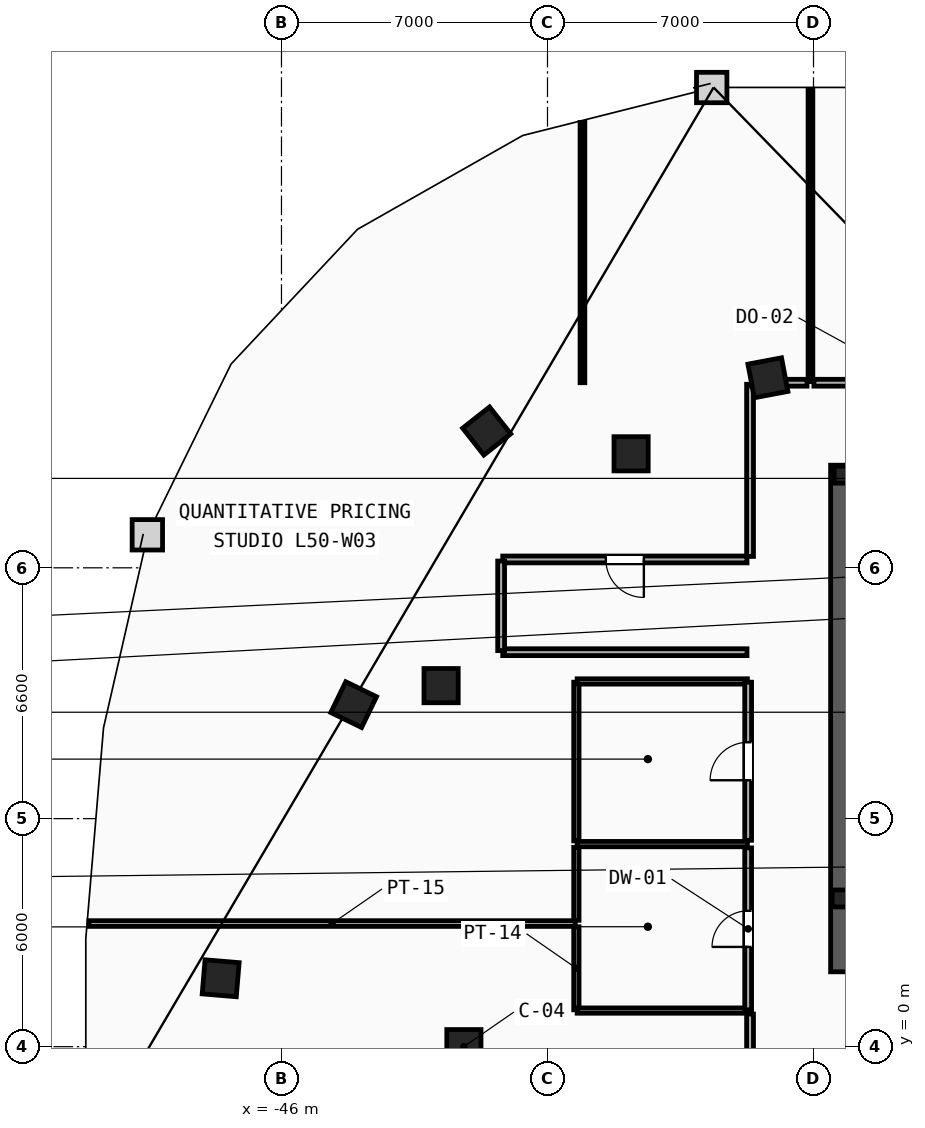
"""IFC4 building model, lengths in metres.
Left out: names, types, materials, properties, quantities, classifications, styles, units other than length and angle.
Written with IfcOpenShell. Run it as: python <this file> out.ifc"""

import sys

from ifc_helpers import new_model, si_unit, direction, frame, frame_2d, origin, origin_2d, place, context, subcontext, project, spatial, rectangle, i_section, extrude, element, fill, save


model = new_model("IFC4")
c1 = context("Model", 3, precision=1e-05, world=origin(), true_north=direction((0.0, 1.0)))
c2 = subcontext(c1, "Body", "Model", "MODEL_VIEW")
j1 = project(units=[si_unit("LENGTHUNIT", "METRE"), si_unit("PLANEANGLEUNIT", "RADIAN")], contexts=[c1])
p1 = place(None, origin())
s1 = spatial("IfcSite", under=j1, at=p1, CompositionType="ELEMENT")
p2 = place(p1, origin())
s2 = spatial("IfcBuilding", under=s1, at=p2, CompositionType="ELEMENT")
p3 = place(p2, frame((0.0, 0.0, 191.8)))
s3 = spatial("IfcBuildingStorey", under=s2, at=p3, CompositionType="ELEMENT", Elevation=191.8)
for number, where, z_axis, x_axis in (
    (1, (-31.3, 3.9, 0.0), (0.0, 0.0, 1.0), (1.0, 0.0, 0.0)),
    (2, (-31.25, 15.05, 0.0), (0.0, 0.0, 1.0), (1.0, 0.0, 0.0)),
):
    element("IfcColumn", number, at=place(p3, frame(where, z_axis=z_axis, x_axis=x_axis)), inside=s3, PredefinedType="COLUMN", context=c2, shape_type="SweptSolid", body=[
        extrude(i_section(OverallWidth=0.416, OverallDepth=0.446, WebThickness=0.039, FlangeThickness=0.063, FilletRadius=0.018, at=origin_2d()), origin(), (0.0, 0.0, 1.0), 3.6),
    ])
for number, where, z_axis, x_axis in (
    (3, (-41.2, 0.0, 0.0), (0.0, 0.0, 1.0), (1.0, 0.0, 0.0)),
    (4, (-41.8, 9.5, 0.0), (0.0, 0.0, 1.0), (1.0, 0.0, 0.0)),
    (5, (-36.8, 15.6, 0.0), (0.0, 0.0, 1.0), (1.0, 0.0, 0.0)),
    (6, (-33.2, 17.6, 0.0), (0.0, 0.0, 1.0), (-0.983, -0.186, 0.0)),
    (7, (-40.6, 16.2, 0.0), (0.0, 0.0, 1.0), (-0.785, -0.619, 0.0)),
    (8, (-44.1, 9.0, 0.0), (0.0, 0.0, 1.0), (-0.437, -0.899, 0.0)),
    (9, (-47.6, 1.8, 0.0), (0.0, 0.0, 1.0), (-0.084, -0.997, 0.0)),
):
    element("IfcColumn", number, at=place(p3, frame(where, z_axis=z_axis, x_axis=x_axis)), inside=s3, PredefinedType="COLUMN", context=c2, shape_type="SweptSolid", body=[
        extrude(rectangle(XDim=0.9, YDim=0.9, at=origin_2d()), origin(), (0.0, 0.0, 1.0), 3.6),
    ])
p4 = place(p3, frame((-31.225, 1.97, 0.0), z_axis=(0.0, 0.0, 1.0), x_axis=(0.0, 1.0, 0.0)))
e10 = element("IfcWall", 10, at=p4, inside=s3, PredefinedType="SHEAR", context=c2, shape_type="SweptSolid", body=[
    extrude(rectangle(XDim=13.33, YDim=0.65, at=frame_2d((6.665, 0.0))), origin(), (0.0, 0.0, 1.0), 3.34),
])
p5 = place(p3, frame((-31.2, 15.1, 0.0), z_axis=(0.0, 0.0, 1.0), x_axis=(1.0, 0.0, 0.0)))
e11 = element("IfcWall", 11, at=p5, inside=s3, PredefinedType="SHEAR", context=c2, shape_type="SweptSolid", body=[
    extrude(rectangle(XDim=2.5, YDim=0.3, at=frame_2d((1.25, 0.0))), origin(), (0.0, 0.0, 1.0), 3.34),
])
p6 = place(p3, frame((-38.24, 0.97, 0.0), z_axis=(0.0, 0.0, 1.0), x_axis=(0.0, 1.0, 0.0)))
e12 = element("IfcWall", 12, at=p6, inside=s3, PredefinedType="PARTITIONING", context=c2, shape_type="SweptSolid", body=[
    extrude(rectangle(XDim=2.185, YDim=0.14, at=frame_2d((1.093, 0.0))), origin(), (0.0, 0.0, 1.0), 3.34),
])
p7 = place(p3, frame((-38.24, 3.325, 0.0), z_axis=(0.0, 0.0, 1.0), x_axis=(0.0, 1.0, 0.0)))
e13 = element("IfcWall", 13, at=p7, inside=s3, PredefinedType="PARTITIONING", context=c2, shape_type="SweptSolid", body=[
    extrude(rectangle(XDim=1.92, YDim=0.14, at=frame_2d((0.96, 0.0))), origin(), (0.0, 0.0, 1.0), 3.34),
])
p8 = place(p3, frame((-38.24, 5.415, 0.0), z_axis=(0.0, 0.0, 1.0), x_axis=(0.0, 1.0, 0.0)))
e14 = element("IfcWall", 14, at=p8, inside=s3, PredefinedType="PARTITIONING", context=c2, shape_type="SweptSolid", body=[
    extrude(rectangle(XDim=4.175, YDim=0.14, at=frame_2d((2.087, 0.0))), origin(), (0.0, 0.0, 1.0), 3.34),
])
for number, where, z_axis, x_axis in (
    (15, (-38.22, 0.95, 0.0), (0.0, 0.0, 1.0), (1.0, 0.0, 0.0)),
    (16, (-38.22, 5.33, 0.0), (0.0, 0.0, 1.0), (1.0, 0.0, 0.0)),
    (17, (-38.22, 9.61, 0.0), (0.0, 0.0, 1.0), (1.0, 0.0, 0.0)),
):
    element("IfcWall", number, at=place(p3, frame(where, z_axis=z_axis, x_axis=x_axis)), inside=s3, PredefinedType="PARTITIONING", context=c2, shape_type="SweptSolid", body=[
        extrude(rectangle(XDim=4.48, YDim=0.14, at=frame_2d((2.24, 0.0))), origin(), (0.0, 0.0, 1.0), 3.34),
    ])
p9 = place(p3, frame((-33.72, 0.97, 0.0), z_axis=(0.0, 0.0, 1.0), x_axis=(0.0, 1.0, 0.0)))
e18 = element("IfcWall", 18, at=p9, inside=s3, PredefinedType="PARTITIONING", context=c2, shape_type="SweptSolid", body=[
    extrude(rectangle(XDim=4.26, YDim=0.18, at=frame_2d((2.13, 0.0))), origin(), (0.0, 0.0, 1.0), 3.34),
])
p10 = place(p9, frame((1.655, 0.0, 0.0)))
e19 = element("IfcOpeningElement", 19, at=p10, cuts=e18, PredefinedType="OPENING", context=c2, shape_type="SweptSolid", body=[
    extrude(rectangle(XDim=0.95, YDim=2.1, at=frame_2d((0.475, 1.05))), frame((0.0, 0.1, 0.0), z_axis=(0.0, -1.0, 0.0), x_axis=(1.0, 0.0, 0.0)), (0.0, 0.0, 1.0), 0.2),
])
p11 = place(p3, frame((-33.72, 5.43, 0.0), z_axis=(0.0, 0.0, 1.0), x_axis=(0.0, 1.0, 0.0)))
e20 = element("IfcWall", 20, at=p11, inside=s3, PredefinedType="PARTITIONING", context=c2, shape_type="SweptSolid", body=[
    extrude(rectangle(XDim=4.16, YDim=0.18, at=frame_2d((2.08, 0.0))), origin(), (0.0, 0.0, 1.0), 3.34),
])
p12 = place(p11, frame((1.58, 0.0, 0.0)))
e21 = element("IfcOpeningElement", 21, at=p12, cuts=e20, PredefinedType="OPENING", context=c2, shape_type="SweptSolid", body=[
    extrude(rectangle(XDim=1.0, YDim=2.15, at=frame_2d((0.5, 1.075))), frame((0.0, 0.1, 0.0), z_axis=(0.0, -1.0, 0.0), x_axis=(1.0, 0.0, 0.0)), (0.0, 0.0, 1.0), 0.2),
])
p13 = place(p3, frame((-51.066, 3.24, 0.0), z_axis=(0.0, 0.0, 1.0), x_axis=(1.0, 0.0, 0.0)))
e22 = element("IfcWall", 22, at=p13, inside=s3, PredefinedType="PARTITIONING", context=c2, shape_type="SweptSolid", body=[
    extrude(rectangle(XDim=12.796, YDim=0.15, at=frame_2d((6.398, 0.0))), origin(), (0.0, 0.0, 1.0), 3.34),
])
p14 = place(p3, frame((-38.08, 17.47, 0.0), z_axis=(0.0, 0.0, 1.0), x_axis=(0.0, 1.0, 0.0)))
e23 = element("IfcWall", 23, at=p14, inside=s3, PredefinedType="PARTITIONING", context=c2, shape_type="SweptSolid", body=[
    extrude(rectangle(XDim=6.85, YDim=0.125, at=frame_2d((3.425, 0.0))), origin(), (0.0, 0.0, 1.0), 3.34),
])
p15 = place(p3, frame((-32.08, 17.5, 0.0), z_axis=(0.0, 0.0, 1.0), x_axis=(0.0, 1.0, 0.0)))
e24 = element("IfcWall", 24, at=p15, inside=s3, PredefinedType="PARTITIONING", context=c2, shape_type="SweptSolid", body=[
    extrude(rectangle(XDim=7.69, YDim=0.125, at=frame_2d((3.845, 0.0))), origin(), (0.0, 0.0, 1.0), 3.34),
])
p16 = place(p3, frame((-33.67, 0.859, 0.0), z_axis=(0.0, 0.0, 1.0), x_axis=(0.0, -1.0, 0.0)))
e25 = element("IfcWall", 25, at=p16, inside=s3, PredefinedType="PARTITIONING", context=c2, shape_type="SweptSolid", body=[
    extrude(rectangle(XDim=1.187, YDim=0.18, at=frame_2d((0.594, 0.0))), origin(), (0.0, 0.0, 1.0), 3.34),
])
p17 = place(p3, frame((-33.75, 12.82, 0.0), z_axis=(0.0, 0.0, 1.0), x_axis=(-1.0, 0.0, 0.0)))
e26 = element("IfcWall", 26, at=p17, inside=s3, PredefinedType="PARTITIONING", context=c2, shape_type="SweptSolid", body=[
    extrude(rectangle(XDim=6.428, YDim=0.18, at=frame_2d((3.214, 0.0))), origin(), (0.0, 0.0, 1.0), 3.34),
])
p18 = place(p17, frame((2.714, 0.0, 0.0)))
e27 = element("IfcOpeningElement", 27, at=p18, cuts=e26, PredefinedType="OPENING", context=c2, shape_type="SweptSolid", body=[
    extrude(rectangle(XDim=1.0, YDim=2.15, at=frame_2d((0.5, 1.075))), frame((0.0, 0.1, 0.0), z_axis=(0.0, -1.0, 0.0), x_axis=(1.0, 0.0, 0.0)), (0.0, 0.0, 1.0), 0.2),
])
p19 = place(p3, frame((-40.178, 10.38, 0.0), z_axis=(0.0, 0.0, 1.0), x_axis=(1.0, 0.0, 0.0)))
e28 = element("IfcWall", 28, at=p19, inside=s3, PredefinedType="PARTITIONING", context=c2, shape_type="SweptSolid", body=[
    extrude(rectangle(XDim=6.428, YDim=0.18, at=frame_2d((3.214, 0.0))), origin(), (0.0, 0.0, 1.0), 3.34),
])
p20 = place(p3, frame((-33.67, 17.428, 0.0), z_axis=(0.0, 0.0, 1.0), x_axis=(0.0, -1.0, 0.0)))
e29 = element("IfcWall", 29, at=p20, inside=s3, PredefinedType="PARTITIONING", context=c2, shape_type="SweptSolid", body=[
    extrude(rectangle(XDim=4.529, YDim=0.18, at=frame_2d((2.264, 0.0))), origin(), (0.0, 0.0, 1.0), 3.34),
])
p21 = place(p3, frame((-40.22, 12.779, 0.0), z_axis=(0.0, 0.0, 1.0), x_axis=(0.0, -1.0, 0.0)))
e30 = element("IfcWall", 30, at=p21, inside=s3, PredefinedType="PARTITIONING", context=c2, shape_type="SweptSolid", body=[
    extrude(rectangle(XDim=2.357, YDim=0.18, at=frame_2d((1.179, 0.0))), origin(), (0.0, 0.0, 1.0), 3.34),
])
p22 = place(p3, frame((-32.17, 17.47, 0.0), z_axis=(0.0, 0.0, 1.0), x_axis=(-1.0, 0.0, 0.0)))
e31 = element("IfcWall", 31, at=p22, inside=s3, PredefinedType="PARTITIONING", context=c2, shape_type="SweptSolid", body=[
    extrude(rectangle(XDim=1.458, YDim=0.18, at=frame_2d((0.729, 0.0))), origin(), (0.0, 0.0, 1.0), 3.34),
])
p23 = place(p3, frame((-26.57, 17.47, 0.0), z_axis=(0.0, 0.0, 1.0), x_axis=(-1.0, 0.0, 0.0)))
e32 = element("IfcWall", 32, at=p23, inside=s3, PredefinedType="PARTITIONING", context=c2, shape_type="SweptSolid", body=[
    extrude(rectangle(XDim=5.42, YDim=0.18, at=frame_2d((2.71, 0.0))), origin(), (0.0, 0.0, 1.0), 3.34),
])
p24 = place(p23, frame((1.91, 0.0, 0.0)))
e33 = element("IfcOpeningElement", 33, at=p24, cuts=e32, PredefinedType="OPENING", context=c2, shape_type="SweptSolid", body=[
    extrude(rectangle(XDim=1.6, YDim=2.2, at=frame_2d((0.8, 1.1))), frame((0.0, 0.1, 0.0), z_axis=(0.0, -1.0, 0.0), x_axis=(1.0, 0.0, 0.0)), (0.0, 0.0, 1.0), 0.2),
])
p25 = place(p18, origin())
e34 = element("IfcDoor", 34, at=p25, inside=s3, OperationType="SINGLE_SWING_LEFT", PredefinedType="DOOR", context=c2, shape_type="SweptSolid", body=[
    extrude(rectangle(XDim=1.0, YDim=2.15, at=frame_2d((0.5, 1.075))), frame((0.0, 0.025, 0.0), z_axis=(0.0, -1.0, 0.0), x_axis=(1.0, 0.0, 0.0)), (0.0, 0.0, 1.0), 0.05),
])
fill(e27, e34)
p26 = place(p10, origin())
e35 = element("IfcDoor", 35, at=p26, inside=s3, OperationType="SINGLE_SWING_LEFT", PredefinedType="DOOR", context=c2, shape_type="SweptSolid", body=[
    extrude(rectangle(XDim=0.95, YDim=2.1, at=frame_2d((0.475, 1.05))), frame((0.0, 0.025, 0.0), z_axis=(0.0, -1.0, 0.0), x_axis=(1.0, 0.0, 0.0)), (0.0, 0.0, 1.0), 0.05),
])
fill(e19, e35)
p27 = place(p12, origin())
e36 = element("IfcDoor", 36, at=p27, inside=s3, OperationType="SINGLE_SWING_LEFT", PredefinedType="DOOR", context=c2, shape_type="SweptSolid", body=[
    extrude(rectangle(XDim=1.0, YDim=2.15, at=frame_2d((0.5, 1.075))), frame((0.0, 0.025, 0.0), z_axis=(0.0, -1.0, 0.0), x_axis=(1.0, 0.0, 0.0)), (0.0, 0.0, 1.0), 0.05),
])
fill(e21, e36)
save(model, sys.argv[1])
